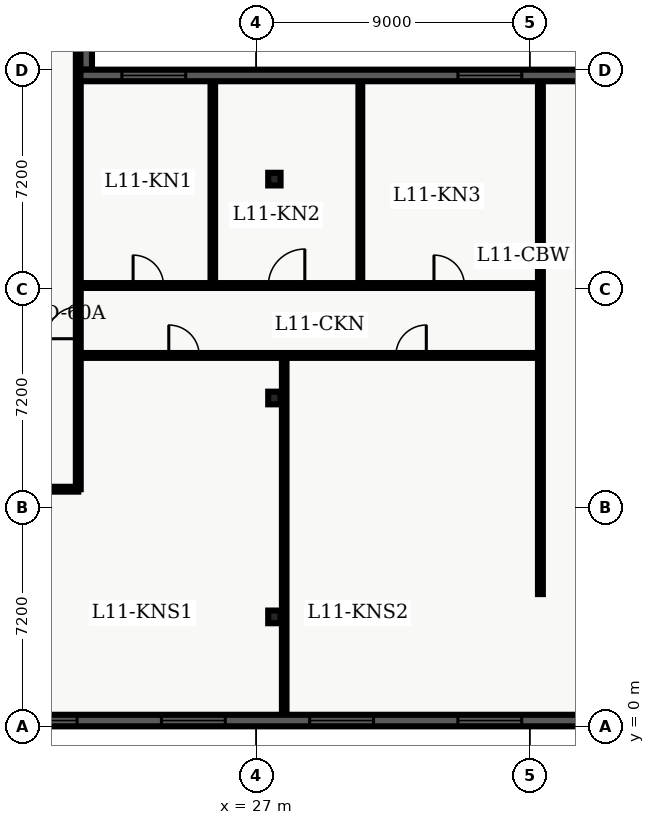
"""IFC4 building model, lengths in metres.
Left out: names, types, materials, properties, quantities, classifications, styles, units other than length and angle.
Written with IfcOpenShell. Run it as: python <this file> out.ifc"""

import sys

from ifc_helpers import new_model, entity, si_unit, converted_unit, direction, frame, origin_with_axes, origin_2d_with_axis, place, context, subcontext, project, spatial, polyline, rectangle, i_section, outline, extrude, element, fill, save


model = new_model("IFC4")
c1 = context("Model", 3, precision=1e-05, world=origin_with_axes(), true_north=direction((0.0, 1.0)))
c2 = subcontext(c1, "Body", "Model", "MODEL_VIEW")
j1 = project(units=[si_unit("LENGTHUNIT", "METRE"), converted_unit("PLANEANGLEUNIT", "DEGREE", entity("IfcPlaneAngleMeasure", 0.017), si_unit("PLANEANGLEUNIT", "RADIAN"), dimensions=[0, 0, 0, 0, 0, 0, 0])], contexts=[c1])
p1 = place(None, origin_with_axes())
s1 = spatial("IfcSite", under=j1, at=p1, CompositionType="ELEMENT")
p2 = place(p1, origin_with_axes())
s2 = spatial("IfcBuilding", under=s1, at=p2, CompositionType="ELEMENT")
p3 = place(p2, frame((0.0, 0.0, 48.3), z_axis=(0.0, 0.0, 1.0), x_axis=(1.0, 0.0, 0.0)))
s3 = spatial("IfcBuildingStorey", under=s2, at=p3, CompositionType="ELEMENT", Elevation=48.3)
for number, where, z_axis, x_axis in (
    (1, (27.6, 3.6, 0.0), (0.0, 0.0, 1.0), (1.0, 0.0, 0.0)),
    (2, (27.6, 10.8, 0.0), (0.0, 0.0, 1.0), (1.0, 0.0, 0.0)),
    (3, (27.6, 18.0, 0.0), (0.0, 0.0, 1.0), (1.0, 0.0, 0.0)),
):
    element("IfcColumn", number, at=place(p3, frame(where, z_axis=z_axis, x_axis=x_axis)), inside=s3, PredefinedType="COLUMN", context=c2, shape_type="SweptSolid", body=[
        extrude(i_section(OverallWidth=0.406, OverallDepth=0.416, WebThickness=0.03, FlangeThickness=0.048, FilletRadius=0.022, at=origin_2d_with_axis()), origin_with_axes(), (0.0, 0.0, 1.0), 3.9),
    ])
p4 = place(p3, frame((2.6, 7.8, 0.0), z_axis=(0.0, 0.0, 1.0), x_axis=(1.0, 0.0, 0.0)))
e4 = element("IfcWall", 4, at=p4, inside=s3, PredefinedType="PARTITIONING", context=c2, shape_type="SweptSolid", body=[
    extrude(outline(polyline([(0.0, -0.08), (18.55, -0.08), (18.55, 0.08), (0.0, 0.08), (0.0, -0.08)])), origin_with_axes(), (0.0, 0.0, 1.0), 2.7),
])
p5 = place(p4, frame((2.225, 0.0, 0.0), z_axis=(0.0, 0.0, 1.0), x_axis=(1.0, 0.0, 0.0)))
e5 = element("IfcOpeningElement", 5, at=p5, cuts=e4, PredefinedType="OPENING", context=c2, shape_type="SweptSolid", body=[
    extrude(rectangle(XDim=1.0, YDim=0.18, at=origin_2d_with_axis()), origin_with_axes(), (0.0, 0.0, 1.0), 2.15),
])
p6 = place(p4, frame((8.043, 0.0, 0.0), z_axis=(0.0, 0.0, 1.0), x_axis=(1.0, 0.0, 0.0)))
e6 = element("IfcOpeningElement", 6, at=p6, cuts=e4, PredefinedType="OPENING", context=c2, shape_type="SweptSolid", body=[
    extrude(rectangle(XDim=1.0, YDim=0.18, at=origin_2d_with_axis()), origin_with_axes(), (0.0, 0.0, 1.0), 2.15),
])
p7 = place(p4, frame((14.784, 0.0, 0.0), z_axis=(0.0, 0.0, 1.0), x_axis=(1.0, 0.0, 0.0)))
e7 = element("IfcOpeningElement", 7, at=p7, cuts=e4, PredefinedType="OPENING", context=c2, shape_type="SweptSolid", body=[
    extrude(rectangle(XDim=1.0, YDim=0.18, at=origin_2d_with_axis()), origin_with_axes(), (0.0, 0.0, 1.0), 2.15),
])
p8 = place(p3, frame((21.15, 7.8, 0.0), z_axis=(0.0, 0.0, 1.0), x_axis=(0.0, 1.0, 0.0)))
e8 = element("IfcWall", 8, at=p8, inside=s3, PredefinedType="PARTITIONING", context=c2, shape_type="SweptSolid", body=[
    extrude(outline(polyline([(0.0, -0.08), (32.7, -0.08), (32.7, 0.08), (0.0, 0.08), (0.0, -0.08)])), origin_with_axes(), (0.0, 0.0, 1.0), 2.7),
])
p9 = place(p8, frame((5.475, 0.0, 0.0), z_axis=(0.0, 0.0, 1.0), x_axis=(1.0, 0.0, 0.0)))
e9 = element("IfcOpeningElement", 9, at=p9, cuts=e8, PredefinedType="OPENING", context=c2, shape_type="SweptSolid", body=[
    extrude(rectangle(XDim=1.05, YDim=0.18, at=origin_2d_with_axis()), origin_with_axes(), (0.0, 0.0, 1.0), 2.15),
])
p10 = place(p3, frame((21.15, 12.2, 0.0), z_axis=(0.0, 0.0, 1.0), x_axis=(1.0, 0.0, 0.0)))
e10 = element("IfcWall", 10, at=p10, inside=s3, PredefinedType="PARTITIONING", context=c2, shape_type="SweptSolid", body=[
    extrude(outline(polyline([(0.0, -0.08), (15.2, -0.08), (15.2, 0.08), (0.0, 0.08), (0.0, -0.08)])), origin_with_axes(), (0.0, 0.0, 1.0), 2.7),
])
p11 = place(p10, frame((3.477, 0.0, 0.0), z_axis=(0.0, 0.0, 1.0), x_axis=(1.0, 0.0, 0.0)))
e11 = element("IfcOpeningElement", 11, at=p11, cuts=e10, PredefinedType="OPENING", context=c2, shape_type="SweptSolid", body=[
    extrude(rectangle(XDim=1.0, YDim=0.18, at=origin_2d_with_axis()), origin_with_axes(), (0.0, 0.0, 1.0), 2.15),
])
p12 = place(p10, frame((10.947, 0.0, 0.0), z_axis=(0.0, 0.0, 1.0), x_axis=(1.0, 0.0, 0.0)))
e12 = element("IfcOpeningElement", 12, at=p12, cuts=e10, PredefinedType="OPENING", context=c2, shape_type="SweptSolid", body=[
    extrude(rectangle(XDim=1.0, YDim=0.18, at=origin_2d_with_axis()), origin_with_axes(), (0.0, 0.0, 1.0), 2.15),
])
p13 = place(p3, frame((21.15, 14.5, 0.0), z_axis=(0.0, 0.0, 1.0), x_axis=(1.0, 0.0, 0.0)))
e13 = element("IfcWall", 13, at=p13, inside=s3, PredefinedType="PARTITIONING", context=c2, shape_type="SweptSolid", body=[
    extrude(outline(polyline([(0.0, -0.08), (15.2, -0.08), (15.2, 0.08), (0.0, 0.08), (0.0, -0.08)])), origin_with_axes(), (0.0, 0.0, 1.0), 2.7),
])
p14 = place(p13, frame((2.303, 0.0, 0.0), z_axis=(0.0, 0.0, 1.0), x_axis=(1.0, 0.0, 0.0)))
e14 = element("IfcOpeningElement", 14, at=p14, cuts=e13, PredefinedType="OPENING", context=c2, shape_type="SweptSolid", body=[
    extrude(rectangle(XDim=1.0, YDim=0.18, at=origin_2d_with_axis()), origin_with_axes(), (0.0, 0.0, 1.0), 2.15),
])
p15 = place(p13, frame((6.851, 0.0, 0.0), z_axis=(0.0, 0.0, 1.0), x_axis=(1.0, 0.0, 0.0)))
e15 = element("IfcOpeningElement", 15, at=p15, cuts=e13, PredefinedType="OPENING", context=c2, shape_type="SweptSolid", body=[
    extrude(rectangle(XDim=1.2, YDim=0.18, at=origin_2d_with_axis()), origin_with_axes(), (0.0, 0.0, 1.0), 2.2),
])
p16 = place(p13, frame((12.198, 0.0, 0.0), z_axis=(0.0, 0.0, 1.0), x_axis=(1.0, 0.0, 0.0)))
e16 = element("IfcOpeningElement", 16, at=p16, cuts=e13, PredefinedType="OPENING", context=c2, shape_type="SweptSolid", body=[
    extrude(rectangle(XDim=1.0, YDim=0.18, at=origin_2d_with_axis()), origin_with_axes(), (0.0, 0.0, 1.0), 2.15),
])
p17 = place(p3, frame((36.35, 4.35, 0.0), z_axis=(0.0, 0.0, 1.0), x_axis=(0.0, 1.0, 0.0)))
e17 = element("IfcWall", 17, at=p17, inside=s3, PredefinedType="PARTITIONING", context=c2, shape_type="SweptSolid", body=[
    extrude(outline(polyline([(0.0, -0.08), (16.95, -0.08), (16.95, 0.08), (0.0, 0.08), (0.0, -0.08)])), origin_with_axes(), (0.0, 0.0, 1.0), 2.7),
])
p18 = place(p3, frame((27.923, 0.36, 0.0), z_axis=(0.0, 0.0, 1.0), x_axis=(0.0, 1.0, 0.0)))
e18 = element("IfcWall", 18, at=p18, inside=s3, PredefinedType="PARTITIONING", context=c2, shape_type="SweptSolid", body=[
    extrude(outline(polyline([(0.0, -0.075), (11.72, -0.075), (11.72, 0.075), (0.0, 0.075), (0.0, -0.075)])), origin_with_axes(), (0.0, 0.0, 1.0), 2.7),
])
p19 = place(p3, frame((25.575, 14.62, 0.0), z_axis=(0.0, 0.0, 1.0), x_axis=(0.0, 1.0, 0.0)))
e19 = element("IfcWall", 19, at=p19, inside=s3, PredefinedType="PARTITIONING", context=c2, shape_type="SweptSolid", body=[
    extrude(outline(polyline([(0.0, -0.075), (6.605, -0.075), (6.605, 0.075), (0.0, 0.075), (0.0, -0.075)])), origin_with_axes(), (0.0, 0.0, 1.0), 2.7),
])
p20 = place(p3, frame((30.427, 14.62, 0.0), z_axis=(0.0, 0.0, 1.0), x_axis=(0.0, 1.0, 0.0)))
e20 = element("IfcWall", 20, at=p20, inside=s3, PredefinedType="PARTITIONING", context=c2, shape_type="SweptSolid", body=[
    extrude(outline(polyline([(0.0, -0.062), (6.605, -0.062), (6.605, 0.062), (0.0, 0.062), (0.0, -0.062)])), origin_with_axes(), (0.0, 0.0, 1.0), 2.7),
])
p21 = place(p3, frame((57.22, 0.19, 0.0), z_axis=(0.0, 0.0, 1.0), x_axis=(-1.0, 0.0, 0.0)))
e21 = element("IfcWall", 21, at=p21, inside=s3, PredefinedType="SOLIDWALL", context=c2, shape_type="SweptSolid", body=[
    extrude(outline(polyline([(0.0, -0.19), (54.82, -0.19), (54.82, 0.19), (0.0, 0.19), (0.0, -0.19)])), origin_with_axes(), (0.0, 0.0, 1.0), 3.66),
])
p22 = place(p21, frame((3.037, 0.0, 0.45), z_axis=(0.0, 0.0, 1.0), x_axis=(1.0, 0.0, 0.0)))
e22 = element("IfcOpeningElement", 22, at=p22, cuts=e21, PredefinedType="OPENING", context=c2, shape_type="SweptSolid", body=[
    extrude(rectangle(XDim=2.1, YDim=0.4, at=origin_2d_with_axis()), origin_with_axes(), (0.0, 0.0, 1.0), 2.2),
])
p23 = place(p21, frame((7.912, 0.0, 0.45), z_axis=(0.0, 0.0, 1.0), x_axis=(1.0, 0.0, 0.0)))
e23 = element("IfcOpeningElement", 23, at=p23, cuts=e21, PredefinedType="OPENING", context=c2, shape_type="SweptSolid", body=[
    extrude(rectangle(XDim=2.1, YDim=0.4, at=origin_2d_with_axis()), origin_with_axes(), (0.0, 0.0, 1.0), 2.2),
])
p24 = place(p21, frame((12.786, 0.0, 0.45), z_axis=(0.0, 0.0, 1.0), x_axis=(1.0, 0.0, 0.0)))
e24 = element("IfcOpeningElement", 24, at=p24, cuts=e21, PredefinedType="OPENING", context=c2, shape_type="SweptSolid", body=[
    extrude(rectangle(XDim=2.1, YDim=0.4, at=origin_2d_with_axis()), origin_with_axes(), (0.0, 0.0, 1.0), 2.2),
])
p25 = place(p21, frame((17.661, 0.0, 0.45), z_axis=(0.0, 0.0, 1.0), x_axis=(1.0, 0.0, 0.0)))
e25 = element("IfcOpeningElement", 25, at=p25, cuts=e21, PredefinedType="OPENING", context=c2, shape_type="SweptSolid", body=[
    extrude(rectangle(XDim=2.1, YDim=0.4, at=origin_2d_with_axis()), origin_with_axes(), (0.0, 0.0, 1.0), 2.2),
])
p26 = place(p21, frame((22.535, 0.0, 0.45), z_axis=(0.0, 0.0, 1.0), x_axis=(1.0, 0.0, 0.0)))
e26 = element("IfcOpeningElement", 26, at=p26, cuts=e21, PredefinedType="OPENING", context=c2, shape_type="SweptSolid", body=[
    extrude(rectangle(XDim=2.1, YDim=0.4, at=origin_2d_with_axis()), origin_with_axes(), (0.0, 0.0, 1.0), 2.2),
])
p27 = place(p21, frame((27.41, 0.0, 0.45), z_axis=(0.0, 0.0, 1.0), x_axis=(1.0, 0.0, 0.0)))
e27 = element("IfcOpeningElement", 27, at=p27, cuts=e21, PredefinedType="OPENING", context=c2, shape_type="SweptSolid", body=[
    extrude(rectangle(XDim=2.1, YDim=0.4, at=origin_2d_with_axis()), origin_with_axes(), (0.0, 0.0, 1.0), 2.2),
])
p28 = place(p21, frame((32.285, 0.0, 0.45), z_axis=(0.0, 0.0, 1.0), x_axis=(1.0, 0.0, 0.0)))
e28 = element("IfcOpeningElement", 28, at=p28, cuts=e21, PredefinedType="OPENING", context=c2, shape_type="SweptSolid", body=[
    extrude(rectangle(XDim=2.1, YDim=0.4, at=origin_2d_with_axis()), origin_with_axes(), (0.0, 0.0, 1.0), 2.2),
])
p29 = place(p21, frame((37.159, 0.0, 0.45), z_axis=(0.0, 0.0, 1.0), x_axis=(1.0, 0.0, 0.0)))
e29 = element("IfcOpeningElement", 29, at=p29, cuts=e21, PredefinedType="OPENING", context=c2, shape_type="SweptSolid", body=[
    extrude(rectangle(XDim=2.1, YDim=0.4, at=origin_2d_with_axis()), origin_with_axes(), (0.0, 0.0, 1.0), 2.2),
])
p30 = place(p21, frame((41.584, 0.0, 0.45), z_axis=(0.0, 0.0, 1.0), x_axis=(1.0, 0.0, 0.0)))
e30 = element("IfcOpeningElement", 30, at=p30, cuts=e21, PredefinedType="OPENING", context=c2, shape_type="SweptSolid", body=[
    extrude(rectangle(XDim=2.1, YDim=0.4, at=origin_2d_with_axis()), origin_with_axes(), (0.0, 0.0, 1.0), 2.2),
])
p31 = place(p21, frame((46.908, 0.0, 0.45), z_axis=(0.0, 0.0, 1.0), x_axis=(1.0, 0.0, 0.0)))
e31 = element("IfcOpeningElement", 31, at=p31, cuts=e21, PredefinedType="OPENING", context=c2, shape_type="SweptSolid", body=[
    extrude(rectangle(XDim=2.1, YDim=0.4, at=origin_2d_with_axis()), origin_with_axes(), (0.0, 0.0, 1.0), 2.2),
])
p32 = place(p21, frame((51.783, 0.0, 0.45), z_axis=(0.0, 0.0, 1.0), x_axis=(1.0, 0.0, 0.0)))
e32 = element("IfcOpeningElement", 32, at=p32, cuts=e21, PredefinedType="OPENING", context=c2, shape_type="SweptSolid", body=[
    extrude(rectangle(XDim=2.1, YDim=0.4, at=origin_2d_with_axis()), origin_with_axes(), (0.0, 0.0, 1.0), 2.2),
])
p33 = place(p3, frame((21.41, 45.82, 0.0), z_axis=(0.0, 0.0, 1.0), x_axis=(0.0, -1.0, 0.0)))
e33 = element("IfcWall", 33, at=p33, inside=s3, PredefinedType="SOLIDWALL", context=c2, shape_type="SweptSolid", body=[
    extrude(outline(polyline([(0.0, -0.19), (24.22, -0.19), (24.22, 0.19), (0.0, 0.19), (0.0, -0.19)])), origin_with_axes(), (0.0, 0.0, 1.0), 3.66),
])
p34 = place(p33, frame((2.902, 0.0, 0.45), z_axis=(0.0, 0.0, 1.0), x_axis=(1.0, 0.0, 0.0)))
e34 = element("IfcOpeningElement", 34, at=p34, cuts=e33, PredefinedType="OPENING", context=c2, shape_type="SweptSolid", body=[
    extrude(rectangle(XDim=2.1, YDim=0.4, at=origin_2d_with_axis()), origin_with_axes(), (0.0, 0.0, 1.0), 2.2),
])
p35 = place(p3, frame((21.22, 21.41, 0.0), z_axis=(0.0, 0.0, 1.0), x_axis=(1.0, 0.0, 0.0)))
e35 = element("IfcWall", 35, at=p35, inside=s3, PredefinedType="SOLIDWALL", context=c2, shape_type="SweptSolid", body=[
    extrude(outline(polyline([(0.0, -0.19), (17.18, -0.19), (17.18, 0.19), (0.0, 0.19), (0.0, -0.19)])), origin_with_axes(), (0.0, 0.0, 1.0), 3.66),
])
p36 = place(p35, frame((2.413, 0.0, 0.45), z_axis=(0.0, 0.0, 1.0), x_axis=(1.0, 0.0, 0.0)))
e36 = element("IfcOpeningElement", 36, at=p36, cuts=e35, PredefinedType="OPENING", context=c2, shape_type="SweptSolid", body=[
    extrude(rectangle(XDim=2.1, YDim=0.4, at=origin_2d_with_axis()), origin_with_axes(), (0.0, 0.0, 1.0), 2.2),
])
p37 = place(p35, frame((13.467, 0.0, 0.45), z_axis=(0.0, 0.0, 1.0), x_axis=(1.0, 0.0, 0.0)))
e37 = element("IfcOpeningElement", 37, at=p37, cuts=e35, PredefinedType="OPENING", context=c2, shape_type="SweptSolid", body=[
    extrude(rectangle(XDim=2.1, YDim=0.4, at=origin_2d_with_axis()), origin_with_axes(), (0.0, 0.0, 1.0), 2.2),
])
p38 = place(p8, frame((5.475, 0.0, 0.0), z_axis=(0.0, 0.0, 1.0), x_axis=(1.0, 0.0, 0.0)))
e38 = element("IfcDoor", 38, at=p38, inside=s3, OperationType="SINGLE_SWING_LEFT", PredefinedType="DOOR", context=c2, shape_type="SweptSolid", body=[
    extrude(rectangle(XDim=1.05, YDim=0.09, at=origin_2d_with_axis()), origin_with_axes(), (0.0, 0.0, 1.0), 2.15),
])
fill(e9, e38)
p39 = place(p10, frame((3.477, 0.0, 0.0), z_axis=(0.0, 0.0, 1.0), x_axis=(1.0, 0.0, 0.0)))
e39 = element("IfcDoor", 39, at=p39, inside=s3, OperationType="SINGLE_SWING_LEFT", PredefinedType="DOOR", context=c2, shape_type="SweptSolid", body=[
    extrude(rectangle(XDim=1.0, YDim=0.09, at=origin_2d_with_axis()), origin_with_axes(), (0.0, 0.0, 1.0), 2.15),
])
fill(e11, e39)
p40 = place(p10, frame((10.947, 0.0, 0.0), z_axis=(0.0, 0.0, 1.0), x_axis=(1.0, 0.0, 0.0)))
e40 = element("IfcDoor", 40, at=p40, inside=s3, OperationType="SINGLE_SWING_RIGHT", PredefinedType="DOOR", context=c2, shape_type="SweptSolid", body=[
    extrude(rectangle(XDim=1.0, YDim=0.09, at=origin_2d_with_axis()), origin_with_axes(), (0.0, 0.0, 1.0), 2.15),
])
fill(e12, e40)
p41 = place(p13, frame((2.303, 0.0, 0.0), z_axis=(0.0, 0.0, 1.0), x_axis=(1.0, 0.0, 0.0)))
e41 = element("IfcDoor", 41, at=p41, inside=s3, OperationType="SINGLE_SWING_LEFT", PredefinedType="DOOR", context=c2, shape_type="SweptSolid", body=[
    extrude(rectangle(XDim=1.0, YDim=0.09, at=origin_2d_with_axis()), origin_with_axes(), (0.0, 0.0, 1.0), 2.15),
])
fill(e14, e41)
p42 = place(p13, frame((6.851, 0.0, 0.0), z_axis=(0.0, 0.0, 1.0), x_axis=(1.0, 0.0, 0.0)))
e42 = element("IfcDoor", 42, at=p42, inside=s3, OperationType="SINGLE_SWING_RIGHT", PredefinedType="DOOR", context=c2, shape_type="SweptSolid", body=[
    extrude(rectangle(XDim=1.2, YDim=0.09, at=origin_2d_with_axis()), origin_with_axes(), (0.0, 0.0, 1.0), 2.2),
])
fill(e15, e42)
p43 = place(p13, frame((12.198, 0.0, 0.0), z_axis=(0.0, 0.0, 1.0), x_axis=(1.0, 0.0, 0.0)))
e43 = element("IfcDoor", 43, at=p43, inside=s3, OperationType="SINGLE_SWING_LEFT", PredefinedType="DOOR", context=c2, shape_type="SweptSolid", body=[
    extrude(rectangle(XDim=1.0, YDim=0.09, at=origin_2d_with_axis()), origin_with_axes(), (0.0, 0.0, 1.0), 2.15),
])
fill(e16, e43)
p44 = place(p21, frame((22.535, 0.0, 0.45), z_axis=(0.0, 0.0, 1.0), x_axis=(1.0, 0.0, 0.0)))
e44 = element("IfcWindow", 44, at=p44, inside=s3, PredefinedType="WINDOW", context=c2, shape_type="SweptSolid", body=[
    extrude(rectangle(XDim=2.1, YDim=0.09, at=origin_2d_with_axis()), origin_with_axes(), (0.0, 0.0, 1.0), 2.2),
])
fill(e26, e44)
p45 = place(p21, frame((27.41, 0.0, 0.45), z_axis=(0.0, 0.0, 1.0), x_axis=(1.0, 0.0, 0.0)))
e45 = element("IfcWindow", 45, at=p45, inside=s3, PredefinedType="WINDOW", context=c2, shape_type="SweptSolid", body=[
    extrude(rectangle(XDim=2.1, YDim=0.09, at=origin_2d_with_axis()), origin_with_axes(), (0.0, 0.0, 1.0), 2.2),
])
fill(e27, e45)
p46 = place(p21, frame((32.285, 0.0, 0.45), z_axis=(0.0, 0.0, 1.0), x_axis=(1.0, 0.0, 0.0)))
e46 = element("IfcWindow", 46, at=p46, inside=s3, PredefinedType="WINDOW", context=c2, shape_type="SweptSolid", body=[
    extrude(rectangle(XDim=2.1, YDim=0.09, at=origin_2d_with_axis()), origin_with_axes(), (0.0, 0.0, 1.0), 2.2),
])
fill(e28, e46)
p47 = place(p21, frame((37.159, 0.0, 0.45), z_axis=(0.0, 0.0, 1.0), x_axis=(1.0, 0.0, 0.0)))
e47 = element("IfcWindow", 47, at=p47, inside=s3, PredefinedType="WINDOW", context=c2, shape_type="SweptSolid", body=[
    extrude(rectangle(XDim=2.1, YDim=0.09, at=origin_2d_with_axis()), origin_with_axes(), (0.0, 0.0, 1.0), 2.2),
])
fill(e29, e47)
p48 = place(p35, frame((2.413, 0.0, 0.45), z_axis=(0.0, 0.0, 1.0), x_axis=(1.0, 0.0, 0.0)))
e48 = element("IfcWindow", 48, at=p48, inside=s3, PredefinedType="WINDOW", context=c2, shape_type="SweptSolid", body=[
    extrude(rectangle(XDim=2.1, YDim=0.09, at=origin_2d_with_axis()), origin_with_axes(), (0.0, 0.0, 1.0), 2.2),
])
fill(e36, e48)
p49 = place(p35, frame((13.467, 0.0, 0.45), z_axis=(0.0, 0.0, 1.0), x_axis=(1.0, 0.0, 0.0)))
e49 = element("IfcWindow", 49, at=p49, inside=s3, PredefinedType="WINDOW", context=c2, shape_type="SweptSolid", body=[
    extrude(rectangle(XDim=2.1, YDim=0.09, at=origin_2d_with_axis()), origin_with_axes(), (0.0, 0.0, 1.0), 2.2),
])
fill(e37, e49)
save(model, sys.argv[1])
